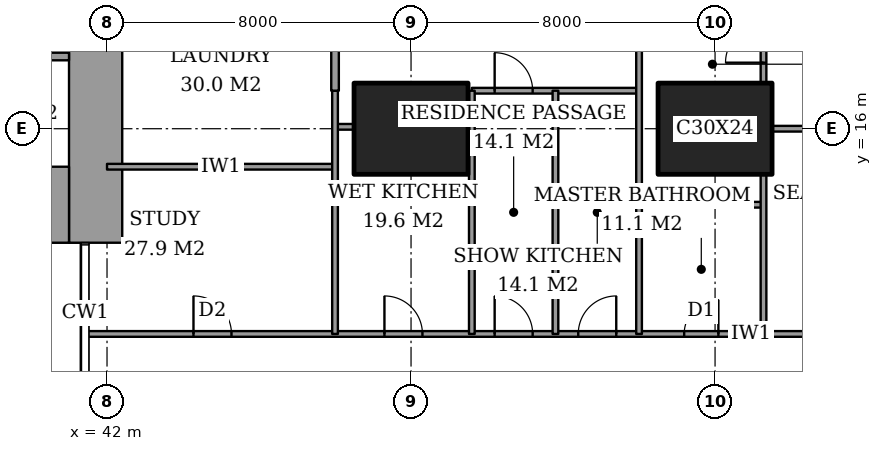
"""IFC4 building model, lengths in metres.
Left out: names, types, materials, properties, quantities, classifications, styles, units other than length and angle.
Written with IfcOpenShell. Run it as: python <this file> out.ifc"""

import sys

from ifc_helpers import new_model, si_unit, direction, frame, frame_2d, origin, origin_2d, place, context, subcontext, project, spatial, rectangle, extrude, element, fill, save


model = new_model("IFC4")
c1 = context("Model", 3, precision=1e-05, world=origin(), true_north=direction((0.0, 1.0)))
c2 = subcontext(c1, "Body", "Model", "MODEL_VIEW")
j1 = project(units=[si_unit("LENGTHUNIT", "METRE"), si_unit("PLANEANGLEUNIT", "RADIAN")], contexts=[c1])
p1 = place(None, origin())
s1 = spatial("IfcSite", under=j1, at=p1, CompositionType="ELEMENT")
p2 = place(p1, origin())
s2 = spatial("IfcBuilding", under=s1, at=p2, CompositionType="ELEMENT")
p3 = place(p2, frame((0.0, 0.0, 76.4)))
s3 = spatial("IfcBuildingStorey", under=s2, at=p3, CompositionType="ELEMENT", Elevation=76.4)
for number, where, z_axis, x_axis in (
    (1, (50.0, 16.0, 0.0), (0.0, 0.0, 1.0), (1.0, 0.0, 0.0)),
    (2, (58.0, 16.0, 0.0), (0.0, 0.0, 1.0), (1.0, 0.0, 0.0)),
):
    element("IfcColumn", number, at=place(p3, frame(where, z_axis=z_axis, x_axis=x_axis)), inside=s3, PredefinedType="COLUMN", context=c2, shape_type="SweptSolid", body=[
        extrude(rectangle(XDim=3.0, YDim=2.4, at=origin_2d()), origin(), (0.0, 0.0, 1.0), 3.6),
    ])
p4 = place(p3, frame((37.85, 14.0, 0.0), z_axis=(0.0, 0.0, 1.0), x_axis=(1.0, 0.0, 0.0)))
e3 = element("IfcWall", 3, at=p4, inside=s3, PredefinedType="SHEAR", context=c2, shape_type="SweptSolid", body=[
    extrude(rectangle(XDim=3.15, YDim=2.0, at=frame_2d((1.575, 0.0))), origin(), (0.0, 0.0, 1.0), 3.6),
])
p5 = place(p3, frame((41.7, 13.0, 0.0), z_axis=(0.0, 0.0, 1.0), x_axis=(0.0, 1.0, 0.0)))
e4 = element("IfcWall", 4, at=p5, inside=s3, PredefinedType="SHEAR", context=c2, shape_type="SweptSolid", body=[
    extrude(rectangle(XDim=11.85, YDim=1.4, at=frame_2d((5.925, 0.0))), origin(), (0.0, 0.0, 1.0), 3.6),
])
p6 = place(p5, frame((7.5, 0.0, 0.0)))
e5 = element("IfcOpeningElement", 5, at=p6, cuts=e4, PredefinedType="OPENING", context=c2, shape_type="SweptSolid", body=[
    extrude(rectangle(XDim=1.8, YDim=2.4, at=frame_2d((0.9, 1.2))), frame((0.0, 0.71, 0.0), z_axis=(0.0, -1.0, 0.0), x_axis=(1.0, 0.0, 0.0)), (0.0, 0.0, 1.0), 1.42),
])
p7 = place(p3, frame((41.439, 10.6, 0.0), z_axis=(0.0, 0.0, 1.0), x_axis=(1.0, 0.0, 0.0)))
e6 = element("IfcWall", 6, at=p7, inside=s3, PredefinedType="PARTITIONING", context=c2, shape_type="SweptSolid", body=[
    extrude(rectangle(XDim=25.011, YDim=0.15, at=frame_2d((12.505, 0.0))), origin(), (0.0, 0.0, 1.0), 3.35),
])
p8 = place(p7, frame((10.761, 0.0, 0.0)))
e7 = element("IfcOpeningElement", 7, at=p8, cuts=e6, PredefinedType="OPENING", context=c2, shape_type="SweptSolid", body=[
    extrude(rectangle(XDim=1.0, YDim=2.1, at=frame_2d((0.5, 1.05))), frame((0.0, 0.085, 0.0), z_axis=(0.0, -1.0, 0.0), x_axis=(1.0, 0.0, 0.0)), (0.0, 0.0, 1.0), 0.17),
])
p9 = place(p7, frame((20.924, 0.0, 0.0)))
e8 = element("IfcOpeningElement", 8, at=p9, cuts=e6, PredefinedType="OPENING", context=c2, shape_type="SweptSolid", body=[
    extrude(rectangle(XDim=1.0, YDim=2.1, at=frame_2d((0.5, 1.05))), frame((0.0, 0.085, 0.0), z_axis=(0.0, -1.0, 0.0), x_axis=(1.0, 0.0, 0.0)), (0.0, 0.0, 1.0), 0.17),
])
p10 = place(p7, frame((15.749, 0.0, 0.0)))
e9 = element("IfcOpeningElement", 9, at=p10, cuts=e6, PredefinedType="OPENING", context=c2, shape_type="SweptSolid", body=[
    extrude(rectangle(XDim=0.9, YDim=2.1, at=frame_2d((0.45, 1.05))), frame((0.0, 0.085, 0.0), z_axis=(0.0, -1.0, 0.0), x_axis=(1.0, 0.0, 0.0)), (0.0, 0.0, 1.0), 0.17),
])
p11 = place(p7, frame((12.961, 0.0, 0.0)))
e10 = element("IfcOpeningElement", 10, at=p11, cuts=e6, PredefinedType="OPENING", context=c2, shape_type="SweptSolid", body=[
    extrude(rectangle(XDim=1.0, YDim=2.1, at=frame_2d((0.5, 1.05))), frame((0.0, 0.085, 0.0), z_axis=(0.0, -1.0, 0.0), x_axis=(1.0, 0.0, 0.0)), (0.0, 0.0, 1.0), 0.17),
])
p12 = place(p7, frame((7.861, 0.0, 0.0)))
e11 = element("IfcOpeningElement", 11, at=p12, cuts=e6, PredefinedType="OPENING", context=c2, shape_type="SweptSolid", body=[
    extrude(rectangle(XDim=1.0, YDim=2.1, at=frame_2d((0.5, 1.05))), frame((0.0, 0.085, 0.0), z_axis=(0.0, -1.0, 0.0), x_axis=(1.0, 0.0, 0.0)), (0.0, 0.0, 1.0), 0.17),
])
p13 = place(p7, frame((2.836, 0.0, 0.0)))
e12 = element("IfcOpeningElement", 12, at=p13, cuts=e6, PredefinedType="OPENING", context=c2, shape_type="SweptSolid", body=[
    extrude(rectangle(XDim=1.0, YDim=2.1, at=frame_2d((0.5, 1.05))), frame((0.0, 0.085, 0.0), z_axis=(0.0, -1.0, 0.0), x_axis=(1.0, 0.0, 0.0)), (0.0, 0.0, 1.0), 0.17),
])
p14 = place(p3, frame((56.0, 14.0, 0.0), z_axis=(0.0, 0.0, 1.0), x_axis=(1.0, 0.0, 0.0)))
e13 = element("IfcWall", 13, at=p14, inside=s3, PredefinedType="PARTITIONING", context=c2, shape_type="SweptSolid", body=[
    extrude(rectangle(XDim=3.275, YDim=0.15, at=frame_2d((1.637, 0.0))), origin(), (0.0, 0.0, 1.0), 3.35),
])
p15 = place(p3, frame((42.0, 15.0, 0.0), z_axis=(0.0, 0.0, 1.0), x_axis=(1.0, 0.0, 0.0)))
e14 = element("IfcWall", 14, at=p15, inside=s3, PredefinedType="PARTITIONING", context=c2, shape_type="SweptSolid", body=[
    extrude(rectangle(XDim=6.0, YDim=0.15, at=frame_2d((3.0, 0.0))), origin(), (0.0, 0.0, 1.0), 3.35),
])
p16 = place(p3, frame((59.5, 16.0, 0.0), z_axis=(0.0, 0.0, 1.0), x_axis=(1.0, 0.0, 0.0)))
e15 = element("IfcWall", 15, at=p16, inside=s3, PredefinedType="PARTITIONING", context=c2, shape_type="SweptSolid", body=[
    extrude(rectangle(XDim=5.15, YDim=0.15, at=frame_2d((2.575, 0.0))), origin(), (0.0, 0.0, 1.0), 2.634),
])
p17 = place(p3, frame((48.0, 16.05, 0.0), z_axis=(0.0, 0.0, 1.0), x_axis=(1.0, 0.0, 0.0)))
e16 = element("IfcWall", 16, at=p17, inside=s3, PredefinedType="PARTITIONING", context=c2, shape_type="SweptSolid", body=[
    extrude(rectangle(XDim=0.5, YDim=0.15, at=frame_2d((0.25, 0.0))), origin(), (0.0, 0.0, 1.0), 2.634),
])
p18 = place(p3, frame((51.6, 17.0, 0.0), z_axis=(0.0, 0.0, 1.0), x_axis=(1.0, 0.0, 0.0)))
e17 = element("IfcWall", 17, at=p18, inside=s3, PredefinedType="PARTITIONING", context=c2, shape_type="SweptSolid", body=[
    extrude(rectangle(XDim=4.4, YDim=0.15, at=frame_2d((2.2, 0.0))), origin(), (0.0, 0.0, 1.0), 3.35),
])
p19 = place(p18, frame((0.6, 0.0, 0.0)))
e18 = element("IfcOpeningElement", 18, at=p19, cuts=e17, PredefinedType="OPENING", context=c2, shape_type="SweptSolid", body=[
    extrude(rectangle(XDim=1.0, YDim=2.1, at=frame_2d((0.5, 1.05))), frame((0.0, 0.085, 0.0), z_axis=(0.0, -1.0, 0.0), x_axis=(1.0, 0.0, 0.0)), (0.0, 0.0, 1.0), 0.17),
])
p20 = place(p3, frame((48.0, 17.0, 0.0), z_axis=(0.0, 0.0, 1.0), x_axis=(0.0, 1.0, 0.0)))
e19 = element("IfcWall", 19, at=p20, inside=s3, PredefinedType="PARTITIONING", context=c2, shape_type="SweptSolid", body=[
    extrude(rectangle(XDim=7.0, YDim=0.2, at=frame_2d((3.5, 0.0))), origin(), (0.0, 0.0, 1.0), 3.35),
])
p21 = place(p20, frame((4.4, 0.0, 0.0)))
e20 = element("IfcOpeningElement", 20, at=p21, cuts=e19, PredefinedType="OPENING", context=c2, shape_type="SweptSolid", body=[
    extrude(rectangle(XDim=1.2, YDim=2.4, at=frame_2d((0.6, 1.2))), frame((0.0, 0.11, 0.0), z_axis=(0.0, -1.0, 0.0), x_axis=(1.0, 0.0, 0.0)), (0.0, 0.0, 1.0), 0.22),
])
p22 = place(p20, frame((1.05, 0.0, 0.0)))
e21 = element("IfcOpeningElement", 21, at=p22, cuts=e19, PredefinedType="OPENING", context=c2, shape_type="SweptSolid", body=[
    extrude(rectangle(XDim=0.9, YDim=2.1, at=frame_2d((0.45, 1.05))), frame((0.0, 0.11, 0.0), z_axis=(0.0, -1.0, 0.0), x_axis=(1.0, 0.0, 0.0)), (0.0, 0.0, 1.0), 0.22),
])
for number, where, z_axis, x_axis in (
    (22, (48.0, 10.6, 0.0), (0.0, 0.0, 1.0), (0.0, 1.0, 0.0)),
    (23, (51.6, 10.6, 0.0), (0.0, 0.0, 1.0), (0.0, 1.0, 0.0)),
    (24, (53.8, 10.6, 0.0), (0.0, 0.0, 1.0), (0.0, 1.0, 0.0)),
):
    element("IfcWall", number, at=place(p3, frame(where, z_axis=z_axis, x_axis=x_axis)), inside=s3, PredefinedType="PARTITIONING", context=c2, shape_type="SweptSolid", body=[
        extrude(rectangle(XDim=6.4, YDim=0.15, at=frame_2d((3.2, 0.0))), origin(), (0.0, 0.0, 1.0), 3.35),
    ])
p23 = place(p3, frame((56.0, 10.6, 0.0), z_axis=(0.0, 0.0, 1.0), x_axis=(0.0, 1.0, 0.0)))
e25 = element("IfcWall", 25, at=p23, inside=s3, PredefinedType="PARTITIONING", context=c2, shape_type="SweptSolid", body=[
    extrude(rectangle(XDim=11.0, YDim=0.15, at=frame_2d((5.5, 0.0))), origin(), (0.0, 0.0, 1.0), 3.35),
])
p24 = place(p23, frame((8.2, 0.0, 0.0)))
e26 = element("IfcOpeningElement", 26, at=p24, cuts=e25, PredefinedType="OPENING", context=c2, shape_type="SweptSolid", body=[
    extrude(rectangle(XDim=1.0, YDim=2.1, at=frame_2d((0.5, 1.05))), frame((0.0, 0.085, 0.0), z_axis=(0.0, -1.0, 0.0), x_axis=(1.0, 0.0, 0.0)), (0.0, 0.0, 1.0), 0.17),
])
p25 = place(p3, frame((59.275, 10.6, 0.0), z_axis=(0.0, 0.0, 1.0), x_axis=(0.0, 1.0, 0.0)))
e27 = element("IfcWall", 27, at=p25, inside=s3, PredefinedType="PARTITIONING", context=c2, shape_type="SweptSolid", body=[
    extrude(rectangle(XDim=4.2, YDim=0.15, at=frame_2d((2.1, 0.0))), origin(), (0.0, 0.0, 1.0), 3.35),
])
p26 = place(p3, frame((59.275, 17.2, 0.0), z_axis=(0.0, 0.0, 1.0), x_axis=(0.0, 1.0, 0.0)))
e28 = element("IfcWall", 28, at=p26, inside=s3, PredefinedType="PARTITIONING", context=c2, shape_type="SweptSolid", body=[
    extrude(rectangle(XDim=2.45, YDim=0.15, at=frame_2d((1.225, 0.0))), origin(), (0.0, 0.0, 1.0), 3.35),
])
p27 = place(p26, frame((0.538, 0.0, 0.0)))
e29 = element("IfcOpeningElement", 29, at=p27, cuts=e28, PredefinedType="OPENING", context=c2, shape_type="SweptSolid", body=[
    extrude(rectangle(XDim=1.0, YDim=2.1, at=frame_2d((0.5, 1.05))), frame((0.0, 0.085, 0.0), z_axis=(0.0, -1.0, 0.0), x_axis=(1.0, 0.0, 0.0)), (0.0, 0.0, 1.0), 0.17),
])
p28 = place(p3, frame((28.3, 17.9, 0.0), z_axis=(0.0, 0.0, 1.0), x_axis=(1.0, 0.0, 0.0)))
e30 = element("IfcWall", 30, at=p28, inside=s3, PredefinedType="PARTITIONING", context=c2, shape_type="SweptSolid", body=[
    extrude(rectangle(XDim=12.7, YDim=0.2, at=frame_2d((6.35, 0.0))), origin(), (0.0, 0.0, 1.0), 3.6),
])
p29 = place(p28, frame((0.95, 0.0, 0.0)))
e31 = element("IfcOpeningElement", 31, at=p29, cuts=e30, PredefinedType="OPENING", context=c2, shape_type="SweptSolid", body=[
    extrude(rectangle(XDim=1.1, YDim=2.1, at=frame_2d((0.55, 1.05))), frame((0.0, 0.11, 0.0), z_axis=(0.0, -1.0, 0.0), x_axis=(1.0, 0.0, 0.0)), (0.0, 0.0, 1.0), 0.22),
])
p30 = place(p28, frame((4.15, 0.0, 0.0)))
e32 = element("IfcOpeningElement", 32, at=p30, cuts=e30, PredefinedType="OPENING", context=c2, shape_type="SweptSolid", body=[
    extrude(rectangle(XDim=1.1, YDim=2.1, at=frame_2d((0.55, 1.05))), frame((0.0, 0.11, 0.0), z_axis=(0.0, -1.0, 0.0), x_axis=(1.0, 0.0, 0.0)), (0.0, 0.0, 1.0), 0.22),
])
p31 = place(p28, frame((7.35, 0.0, 0.0)))
e33 = element("IfcOpeningElement", 33, at=p31, cuts=e30, PredefinedType="OPENING", context=c2, shape_type="SweptSolid", body=[
    extrude(rectangle(XDim=1.1, YDim=2.1, at=frame_2d((0.55, 1.05))), frame((0.0, 0.11, 0.0), z_axis=(0.0, -1.0, 0.0), x_axis=(1.0, 0.0, 0.0)), (0.0, 0.0, 1.0), 0.22),
])
p32 = place(p28, frame((10.6, 0.0, 0.0)))
e34 = element("IfcOpeningElement", 34, at=p32, cuts=e30, PredefinedType="OPENING", context=c2, shape_type="SweptSolid", body=[
    extrude(rectangle(XDim=1.2, YDim=2.1, at=frame_2d((0.6, 1.05))), frame((0.0, 0.11, 0.0), z_axis=(0.0, -1.0, 0.0), x_axis=(1.0, 0.0, 0.0)), (0.0, 0.0, 1.0), 0.22),
])
p33 = place(p8, origin())
e35 = element("IfcDoor", 35, at=p33, inside=s3, OperationType="SINGLE_SWING_RIGHT", PredefinedType="DOOR", context=c2, shape_type="SweptSolid", body=[
    extrude(rectangle(XDim=1.0, YDim=2.1, at=frame_2d((0.5, 1.05))), frame((0.0, 0.025, 0.0), z_axis=(0.0, -1.0, 0.0), x_axis=(1.0, 0.0, 0.0)), (0.0, 0.0, 1.0), 0.05),
])
fill(e7, e35)
p34 = place(p27, origin())
e36 = element("IfcDoor", 36, at=p34, inside=s3, OperationType="SINGLE_SWING_RIGHT", PredefinedType="DOOR", context=c2, shape_type="SweptSolid", body=[
    extrude(rectangle(XDim=1.0, YDim=2.1, at=frame_2d((0.5, 1.05))), frame((0.0, 0.025, 0.0), z_axis=(0.0, -1.0, 0.0), x_axis=(1.0, 0.0, 0.0)), (0.0, 0.0, 1.0), 0.05),
])
fill(e29, e36)
p35 = place(p10, origin())
e37 = element("IfcDoor", 37, at=p35, inside=s3, OperationType="SINGLE_SWING_LEFT", PredefinedType="DOOR", context=c2, shape_type="SweptSolid", body=[
    extrude(rectangle(XDim=0.9, YDim=2.1, at=frame_2d((0.45, 1.05))), frame((0.0, 0.025, 0.0), z_axis=(0.0, -1.0, 0.0), x_axis=(1.0, 0.0, 0.0)), (0.0, 0.0, 1.0), 0.05),
])
fill(e9, e37)
p36 = place(p11, origin())
e38 = element("IfcDoor", 38, at=p36, inside=s3, OperationType="SINGLE_SWING_LEFT", PredefinedType="DOOR", context=c2, shape_type="SweptSolid", body=[
    extrude(rectangle(XDim=1.0, YDim=2.1, at=frame_2d((0.5, 1.05))), frame((0.0, 0.025, 0.0), z_axis=(0.0, -1.0, 0.0), x_axis=(1.0, 0.0, 0.0)), (0.0, 0.0, 1.0), 0.05),
])
fill(e10, e38)
p37 = place(p19, origin())
e39 = element("IfcDoor", 39, at=p37, inside=s3, OperationType="SINGLE_SWING_RIGHT", PredefinedType="DOOR", context=c2, shape_type="SweptSolid", body=[
    extrude(rectangle(XDim=1.0, YDim=2.1, at=frame_2d((0.5, 1.05))), frame((0.0, 0.025, 0.0), z_axis=(0.0, -1.0, 0.0), x_axis=(1.0, 0.0, 0.0)), (0.0, 0.0, 1.0), 0.05),
])
fill(e18, e39)
p38 = place(p12, origin())
e40 = element("IfcDoor", 40, at=p38, inside=s3, OperationType="SINGLE_SWING_RIGHT", PredefinedType="DOOR", context=c2, shape_type="SweptSolid", body=[
    extrude(rectangle(XDim=1.0, YDim=2.1, at=frame_2d((0.5, 1.05))), frame((0.0, 0.025, 0.0), z_axis=(0.0, -1.0, 0.0), x_axis=(1.0, 0.0, 0.0)), (0.0, 0.0, 1.0), 0.05),
])
fill(e11, e40)
p39 = place(p13, origin())
e41 = element("IfcDoor", 41, at=p39, inside=s3, OperationType="SINGLE_SWING_RIGHT", PredefinedType="DOOR", context=c2, shape_type="SweptSolid", body=[
    extrude(rectangle(XDim=1.0, YDim=2.1, at=frame_2d((0.5, 1.05))), frame((0.0, 0.025, 0.0), z_axis=(0.0, -1.0, 0.0), x_axis=(1.0, 0.0, 0.0)), (0.0, 0.0, 1.0), 0.05),
])
fill(e12, e41)
save(model, sys.argv[1])
